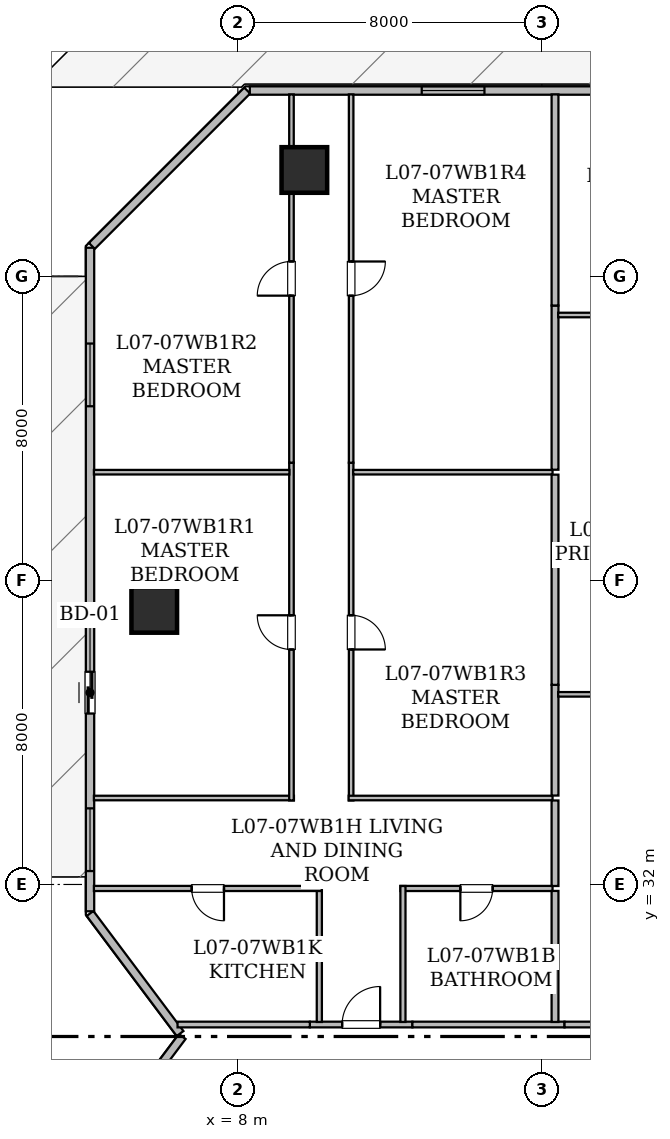
"""IFC4 building model, lengths in metres.
Left out: names, types, materials, properties, quantities, classifications, styles, units other than length and angle.
Written with IfcOpenShell. Run it as: python <this file> out.ifc"""

import sys

from ifc_helpers import new_model, si_unit, direction, frame, frame_2d, origin, origin_2d, place, context, subcontext, project, spatial, rectangle, hollow_rectangle, extrude, element, fill, save


model = new_model("IFC4")
c1 = context("Model", 3, precision=1e-05, world=origin(), true_north=direction((0.0, 1.0)))
c2 = subcontext(c1, "Body", "Model", "MODEL_VIEW")
j1 = project(units=[si_unit("LENGTHUNIT", "METRE"), si_unit("PLANEANGLEUNIT", "RADIAN")], contexts=[c1])
p1 = place(None, origin())
s1 = spatial("IfcSite", under=j1, at=p1, CompositionType="ELEMENT")
p2 = place(p1, origin())
s2 = spatial("IfcBuilding", under=s1, at=p2, CompositionType="ELEMENT")
p3 = place(p2, frame((0.0, 0.0, 33.3)))
s3 = spatial("IfcBuildingStorey", under=s2, at=p3, CompositionType="ELEMENT", Elevation=33.3)
for number, where, z_axis, x_axis in (
    (1, (9.75, 50.8, 0.025), (0.0, 0.0, 1.0), (1.0, 0.0, 0.0)),
    (2, (5.8, 39.225, 0.025), (0.0, 0.0, 1.0), (1.0, 0.0, 0.0)),
):
    element("IfcColumn", number, at=place(p3, frame(where, z_axis=z_axis, x_axis=x_axis)), inside=s3, PredefinedType="COLUMN", context=c2, shape_type="SweptSolid", body=[
        extrude(hollow_rectangle(XDim=1.2, YDim=1.2, WallThickness=0.06, at=origin_2d()), origin(), (0.0, 0.0, 1.0), 3.625),
    ])
p4 = place(p3, frame((4.145, 24.809, 0.0), z_axis=(0.0, 0.0, 1.0), x_axis=(0.599823674734, 0.800132213592, 0.0)))
e3 = element("IfcWall", 3, at=p4, inside=s3, PredefinedType="STANDARD", context=c2, shape_type="SweptSolid", body=[
    extrude(rectangle(XDim=3.988, YDim=0.22, at=frame_2d((1.994, 0.0))), origin(), (0.0, 0.0, 1.0), 3.43),
])
p5 = place(p3, frame((6.48, 28.077, 0.0), z_axis=(0.0, 0.0, 1.0), x_axis=(-0.599960442794, 0.800029666377, 0.0)))
e4 = element("IfcWall", 4, at=p5, inside=s3, PredefinedType="STANDARD", context=c2, shape_type="SweptSolid", body=[
    extrude(rectangle(XDim=3.95, YDim=0.22, at=frame_2d((1.975, 0.0))), origin(), (0.0, 0.0, 1.0), 3.43),
])
p6 = place(p3, frame((4.11, 31.295, 0.0), z_axis=(0.0, 0.0, 1.0), x_axis=(0.0, 1.0, 0.0)))
e5 = element("IfcWall", 5, at=p6, inside=s3, PredefinedType="STANDARD", context=c2, shape_type="SweptSolid", body=[
    extrude(rectangle(XDim=17.459, YDim=0.22, at=frame_2d((8.729, 0.0))), origin(), (0.0, 0.0, 1.0), 3.43),
])
p7 = place(p6, frame((5.203, 0.0, 0.0)))
e6 = element("IfcOpeningElement", 6, at=p7, cuts=e5, PredefinedType="OPENING", context=c2, shape_type="SweptSolid", body=[
    extrude(rectangle(XDim=1.1, YDim=2.2, at=frame_2d((0.55, 1.1))), frame((0.0, 0.12, 0.0), z_axis=(0.0, -1.0, 0.0), x_axis=(1.0, 0.0, 0.0)), (0.0, 0.0, 1.0), 0.24),
])
p8 = place(p6, frame((1.058, 0.0, 0.85)))
e7 = element("IfcOpeningElement", 7, at=p8, cuts=e5, PredefinedType="OPENING", context=c2, shape_type="SweptSolid", body=[
    extrude(rectangle(XDim=1.65, YDim=1.55, at=frame_2d((0.825, 0.775))), frame((0.0, 0.12, 0.0), z_axis=(0.0, -1.0, 0.0), x_axis=(1.0, 0.0, 0.0)), (0.0, 0.0, 1.0), 0.24),
])
p9 = place(p6, frame((13.288, 0.0, 0.85)))
e8 = element("IfcOpeningElement", 8, at=p9, cuts=e5, PredefinedType="OPENING", context=c2, shape_type="SweptSolid", body=[
    extrude(rectangle(XDim=1.65, YDim=1.55, at=frame_2d((0.825, 0.775))), frame((0.0, 0.12, 0.0), z_axis=(0.0, -1.0, 0.0), x_axis=(1.0, 0.0, 0.0)), (0.0, 0.0, 1.0), 0.24),
])
p10 = place(p3, frame((4.158, 48.802, 0.0), z_axis=(0.0, 0.0, 1.0), x_axis=(0.70712789547, 0.707085666273, 0.0)))
e9 = element("IfcWall", 9, at=p10, inside=s3, PredefinedType="STANDARD", context=c2, shape_type="SweptSolid", body=[
    extrude(rectangle(XDim=5.781, YDim=0.22, at=frame_2d((2.891, 0.0))), origin(), (0.0, 0.0, 1.0), 3.43),
])
p11 = place(p3, frame((8.315, 52.89, 0.0), z_axis=(0.0, 0.0, 1.0), x_axis=(1.0, 0.0, 0.0)))
e10 = element("IfcWall", 10, at=p11, inside=s3, PredefinedType="STANDARD", context=c2, shape_type="SweptSolid", body=[
    extrude(rectangle(XDim=37.439, YDim=0.22, at=frame_2d((18.719, 0.0))), origin(), (0.0, 0.0, 1.0), 3.43),
])
p12 = place(p11, frame((19.779, 0.0, 0.0)))
e11 = element("IfcOpeningElement", 11, at=p12, cuts=e10, PredefinedType="OPENING", context=c2, shape_type="SweptSolid", body=[
    extrude(rectangle(XDim=1.0, YDim=2.15, at=frame_2d((0.5, 1.075))), frame((0.0, 0.12, 0.0), z_axis=(0.0, -1.0, 0.0), x_axis=(1.0, 0.0, 0.0)), (0.0, 0.0, 1.0), 0.24),
])
p13 = place(p11, frame((4.524, 0.0, 0.85)))
e12 = element("IfcOpeningElement", 12, at=p13, cuts=e10, PredefinedType="OPENING", context=c2, shape_type="SweptSolid", body=[
    extrude(rectangle(XDim=1.65, YDim=1.55, at=frame_2d((0.825, 0.775))), frame((0.0, 0.12, 0.0), z_axis=(0.0, -1.0, 0.0), x_axis=(1.0, 0.0, 0.0)), (0.0, 0.0, 1.0), 0.24),
])
p14 = place(p11, frame((16.273, 0.0, 0.85)))
e13 = element("IfcOpeningElement", 13, at=p14, cuts=e10, PredefinedType="OPENING", context=c2, shape_type="SweptSolid", body=[
    extrude(rectangle(XDim=1.65, YDim=1.55, at=frame_2d((0.825, 0.775))), frame((0.0, 0.12, 0.0), z_axis=(0.0, -1.0, 0.0), x_axis=(1.0, 0.0, 0.0)), (0.0, 0.0, 1.0), 0.24),
])
p15 = place(p11, frame((14.285, 0.0, 0.8)))
e14 = element("IfcOpeningElement", 14, at=p15, cuts=e10, PredefinedType="OPENING", context=c2, shape_type="SweptSolid", body=[
    extrude(rectangle(XDim=1.2, YDim=1.5, at=frame_2d((0.6, 0.75))), frame((0.0, 0.12, 0.0), z_axis=(0.0, -1.0, 0.0), x_axis=(1.0, 0.0, 0.0)), (0.0, 0.0, 1.0), 0.24),
])
p16 = place(p11, frame((10.238, 0.0, 0.85)))
e15 = element("IfcOpeningElement", 15, at=p16, cuts=e10, PredefinedType="OPENING", context=c2, shape_type="SweptSolid", body=[
    extrude(rectangle(XDim=1.65, YDim=1.55, at=frame_2d((0.825, 0.775))), frame((0.0, 0.12, 0.0), z_axis=(0.0, -1.0, 0.0), x_axis=(1.0, 0.0, 0.0)), (0.0, 0.0, 1.0), 0.24),
])
p17 = place(p11, frame((25.185, 0.0, 0.8)))
e16 = element("IfcOpeningElement", 16, at=p17, cuts=e10, PredefinedType="OPENING", context=c2, shape_type="SweptSolid", body=[
    extrude(rectangle(XDim=1.2, YDim=1.5, at=frame_2d((0.6, 0.75))), frame((0.0, 0.12, 0.0), z_axis=(0.0, -1.0, 0.0), x_axis=(1.0, 0.0, 0.0)), (0.0, 0.0, 1.0), 0.24),
])
p18 = place(p11, frame((28.985, 0.0, 0.85)))
e17 = element("IfcOpeningElement", 17, at=p18, cuts=e10, PredefinedType="OPENING", context=c2, shape_type="SweptSolid", body=[
    extrude(rectangle(XDim=1.65, YDim=1.55, at=frame_2d((0.825, 0.775))), frame((0.0, 0.12, 0.0), z_axis=(0.0, -1.0, 0.0), x_axis=(1.0, 0.0, 0.0)), (0.0, 0.0, 1.0), 0.24),
])
p19 = place(p11, frame((33.49, 0.0, 0.85)))
e18 = element("IfcOpeningElement", 18, at=p19, cuts=e10, PredefinedType="OPENING", context=c2, shape_type="SweptSolid", body=[
    extrude(rectangle(XDim=1.65, YDim=1.55, at=frame_2d((0.825, 0.775))), frame((0.0, 0.12, 0.0), z_axis=(0.0, -1.0, 0.0), x_axis=(1.0, 0.0, 0.0)), (0.0, 0.0, 1.0), 0.24),
])
p20 = place(p11, frame((35.942, 0.0, 0.85)))
e19 = element("IfcOpeningElement", 19, at=p20, cuts=e10, PredefinedType="OPENING", context=c2, shape_type="SweptSolid", body=[
    extrude(rectangle(XDim=1.35, YDim=1.5, at=frame_2d((0.675, 0.75))), frame((0.0, 0.12, 0.0), z_axis=(0.0, -1.0, 0.0), x_axis=(1.0, 0.0, 0.0)), (0.0, 0.0, 1.0), 0.24),
])
p21 = place(p3, frame((9.895, 28.315, 0.0), z_axis=(0.0, 0.0, 1.0), x_axis=(1.0, 0.0, 0.0)))
e20 = element("IfcWall", 20, at=p21, inside=s3, PredefinedType="STANDARD", context=c2, shape_type="SweptSolid", body=[
    extrude(rectangle(XDim=2.698, YDim=0.15, at=frame_2d((1.349, 0.0))), origin(), (0.0, 0.0, 1.0), 3.43),
])
p22 = place(p21, frame((0.849, 0.0, 0.0)))
e21 = element("IfcOpeningElement", 21, at=p22, cuts=e20, PredefinedType="OPENING", context=c2, shape_type="SweptSolid", body=[
    extrude(rectangle(XDim=1.0, YDim=2.15, at=frame_2d((0.5, 1.075))), frame((0.0, 0.085, 0.0), z_axis=(0.0, -1.0, 0.0), x_axis=(1.0, 0.0, 0.0)), (0.0, 0.0, 1.0), 0.17),
])
p23 = place(p3, frame((12.593, 28.315, 0.0), z_axis=(0.0, 0.0, 1.0), x_axis=(1.0, 0.0, 0.0)))
e22 = element("IfcWall", 22, at=p23, inside=s3, PredefinedType="STANDARD", context=c2, shape_type="SweptSolid", body=[
    extrude(rectangle(XDim=4.003, YDim=0.15, at=frame_2d((2.001, 0.0))), origin(), (0.0, 0.0, 1.0), 3.43),
])
p24 = place(p3, frame((6.413, 28.315, 0.0), z_axis=(0.0, 0.0, 1.0), x_axis=(1.0, 0.0, 0.0)))
e23 = element("IfcWall", 23, at=p24, inside=s3, PredefinedType="STANDARD", context=c2, shape_type="SweptSolid", body=[
    extrude(rectangle(XDim=3.482, YDim=0.15, at=frame_2d((1.741, 0.0))), origin(), (0.0, 0.0, 1.0), 3.43),
])
p25 = place(p3, frame((16.596, 28.315, 0.0), z_axis=(0.0, 0.0, 1.0), x_axis=(1.0, 0.0, 0.0)))
e24 = element("IfcWall", 24, at=p25, inside=s3, PredefinedType="STANDARD", context=c2, shape_type="SweptSolid", body=[
    extrude(rectangle(XDim=5.565, YDim=0.15, at=frame_2d((2.782, 0.0))), origin(), (0.0, 0.0, 1.0), 2.647),
])
p26 = place(p3, frame((16.281, 31.895, 0.0), z_axis=(0.0, 0.0, 1.0), x_axis=(-1.0, 0.0, 0.0)))
e25 = element("IfcWall", 25, at=p26, inside=s3, PredefinedType="PARTITIONING", context=c2, shape_type="SweptSolid", body=[
    extrude(rectangle(XDim=4.002, YDim=0.135, at=frame_2d((2.001, 0.0))), origin(), (0.0, 0.0, 1.0), 3.43),
])
p27 = place(p26, frame((1.576, 0.0, 0.0)))
e26 = element("IfcOpeningElement", 26, at=p27, cuts=e25, PredefinedType="OPENING", context=c2, shape_type="SweptSolid", body=[
    extrude(rectangle(XDim=0.85, YDim=2.1, at=frame_2d((0.425, 1.05))), frame((0.0, 0.077, 0.0), z_axis=(0.0, -1.0, 0.0), x_axis=(1.0, 0.0, 0.0)), (0.0, 0.0, 1.0), 0.155),
])
for number, where, z_axis, x_axis in (
    (27, (12.344, 31.96, 0.0), (0.0, 0.0, 1.0), (0.0, -1.0, 0.0)),
    (28, (10.144, 28.382, 0.0), (0.0, 0.0, 1.0), (0.0, 1.0, 0.0)),
):
    element("IfcWall", number, at=place(p3, frame(where, z_axis=z_axis, x_axis=x_axis)), inside=s3, PredefinedType="PARTITIONING", context=c2, shape_type="SweptSolid", body=[
        extrude(rectangle(XDim=3.578, YDim=0.135, at=frame_2d((1.789, 0.0))), origin(), (0.0, 0.0, 1.0), 3.43),
    ])
p28 = place(p3, frame((10.209, 31.895, 0.0), z_axis=(0.0, 0.0, 1.0), x_axis=(-1.0, 0.0, 0.0)))
e29 = element("IfcWall", 29, at=p28, inside=s3, PredefinedType="PARTITIONING", context=c2, shape_type="SweptSolid", body=[
    extrude(rectangle(XDim=5.997, YDim=0.135, at=frame_2d((2.999, 0.0))), origin(), (0.0, 0.0, 1.0), 2.803),
])
p29 = place(p28, frame((2.574, 0.0, 0.0)))
e30 = element("IfcOpeningElement", 30, at=p29, cuts=e29, PredefinedType="OPENING", context=c2, shape_type="SweptSolid", body=[
    extrude(rectangle(XDim=0.85, YDim=2.1, at=frame_2d((0.425, 1.05))), frame((0.0, 0.077, 0.0), z_axis=(0.0, -1.0, 0.0), x_axis=(1.0, 0.0, 0.0)), (0.0, 0.0, 1.0), 0.155),
])
p30 = place(p3, frame((4.212, 34.275, 0.0), z_axis=(0.0, 0.0, 1.0), x_axis=(1.0, 0.0, 0.0)))
e31 = element("IfcWall", 31, at=p30, inside=s3, PredefinedType="PARTITIONING", context=c2, shape_type="SweptSolid", body=[
    extrude(rectangle(XDim=5.264, YDim=0.12, at=frame_2d((2.632, 0.0))), origin(), (0.0, 0.0, 1.0), 2.803),
])
p31 = place(p3, frame((9.411, 34.21, 0.0), z_axis=(0.0, 0.0, 1.0), x_axis=(0.0, 1.0, 0.0)))
e32 = element("IfcWall", 32, at=p31, inside=s3, PredefinedType="PARTITIONING", context=c2, shape_type="SweptSolid", body=[
    extrude(rectangle(XDim=8.887, YDim=0.12, at=frame_2d((4.443, 0.0))), origin(), (0.0, 0.0, 1.0), 2.647),
])
p32 = place(p31, frame((3.973, 0.0, 0.0)))
e33 = element("IfcOpeningElement", 33, at=p32, cuts=e32, PredefinedType="OPENING", context=c2, shape_type="SweptSolid", body=[
    extrude(rectangle(XDim=0.9, YDim=2.1, at=frame_2d((0.45, 1.05))), frame((0.0, 0.07, 0.0), z_axis=(0.0, -1.0, 0.0), x_axis=(1.0, 0.0, 0.0)), (0.0, 0.0, 1.0), 0.14),
])
p33 = place(p3, frame((9.411, 43.097, 0.0), z_axis=(0.0, 0.0, 1.0), x_axis=(0.0, 1.0, 0.0)))
e34 = element("IfcWall", 34, at=p33, inside=s3, PredefinedType="PARTITIONING", context=c2, shape_type="SweptSolid", body=[
    extrude(rectangle(XDim=9.691, YDim=0.12, at=frame_2d((4.846, 0.0))), origin(), (0.0, 0.0, 1.0), 2.647),
])
p34 = place(p33, frame((4.396, 0.0, 0.0)))
e35 = element("IfcOpeningElement", 35, at=p34, cuts=e34, PredefinedType="OPENING", context=c2, shape_type="SweptSolid", body=[
    extrude(rectangle(XDim=0.9, YDim=2.1, at=frame_2d((0.45, 1.05))), frame((0.0, 0.07, 0.0), z_axis=(0.0, -1.0, 0.0), x_axis=(1.0, 0.0, 0.0)), (0.0, 0.0, 1.0), 0.14),
])
p35 = place(p3, frame((10.981, 43.097, 0.0), z_axis=(0.0, 0.0, 1.0), x_axis=(0.0, -1.0, 0.0)))
e36 = element("IfcWall", 36, at=p35, inside=s3, PredefinedType="PARTITIONING", context=c2, shape_type="SweptSolid", body=[
    extrude(rectangle(XDim=8.887, YDim=0.12, at=frame_2d((4.443, 0.0))), origin(), (0.0, 0.0, 1.0), 2.647),
])
p36 = place(p35, frame((4.014, 0.0, 0.0)))
e37 = element("IfcOpeningElement", 37, at=p36, cuts=e36, PredefinedType="OPENING", context=c2, shape_type="SweptSolid", body=[
    extrude(rectangle(XDim=0.9, YDim=2.1, at=frame_2d((0.45, 1.05))), frame((0.0, 0.07, 0.0), z_axis=(0.0, -1.0, 0.0), x_axis=(1.0, 0.0, 0.0)), (0.0, 0.0, 1.0), 0.14),
])
p37 = place(p3, frame((10.916, 34.275, 0.0), z_axis=(0.0, 0.0, 1.0), x_axis=(1.0, 0.0, 0.0)))
e38 = element("IfcWall", 38, at=p37, inside=s3, PredefinedType="PARTITIONING", context=c2, shape_type="SweptSolid", body=[
    extrude(rectangle(XDim=5.365, YDim=0.12, at=frame_2d((2.683, 0.0))), origin(), (0.0, 0.0, 1.0), 3.43),
])
p38 = place(p3, frame((10.981, 52.788, 0.0), z_axis=(0.0, 0.0, 1.0), x_axis=(0.0, -1.0, 0.0)))
e39 = element("IfcWall", 39, at=p38, inside=s3, PredefinedType="PARTITIONING", context=c2, shape_type="SweptSolid", body=[
    extrude(rectangle(XDim=9.691, YDim=0.12, at=frame_2d((4.846, 0.0))), origin(), (0.0, 0.0, 1.0), 2.647),
])
p39 = place(p38, frame((4.396, 0.0, 0.0)))
e40 = element("IfcOpeningElement", 40, at=p39, cuts=e39, PredefinedType="OPENING", context=c2, shape_type="SweptSolid", body=[
    extrude(rectangle(XDim=0.9, YDim=2.1, at=frame_2d((0.45, 1.05))), frame((0.0, 0.07, 0.0), z_axis=(0.0, -1.0, 0.0), x_axis=(1.0, 0.0, 0.0)), (0.0, 0.0, 1.0), 0.14),
])
p40 = place(p3, frame((16.346, 34.21, 0.0), z_axis=(0.0, 0.0, 1.0), x_axis=(0.0, -1.0, 0.0)))
e41 = element("IfcWall", 41, at=p40, inside=s3, PredefinedType="STANDARD", context=c2, shape_type="SweptSolid", body=[
    extrude(rectangle(XDim=2.25, YDim=0.18, at=frame_2d((1.125, 0.0))), origin(), (0.0, 0.0, 1.0), 3.43),
])
p41 = place(p3, frame((16.346, 31.83, 0.0), z_axis=(0.0, 0.0, 1.0), x_axis=(0.0, -1.0, 0.0)))
e42 = element("IfcWall", 42, at=p41, inside=s3, PredefinedType="STANDARD", context=c2, shape_type="SweptSolid", body=[
    extrude(rectangle(XDim=3.448, YDim=0.18, at=frame_2d((1.724, 0.0))), origin(), (0.0, 0.0, 1.0), 3.43),
])
p42 = place(p3, frame((4.212, 42.848, 0.0), z_axis=(0.0, 0.0, 1.0), x_axis=(1.0, 0.0, 0.0)))
e43 = element("IfcWall", 43, at=p42, inside=s3, PredefinedType="PARTITIONING", context=c2, shape_type="SweptSolid", body=[
    extrude(rectangle(XDim=5.145, YDim=0.12, at=frame_2d((2.573, 0.0))), origin(), (0.0, 0.0, 1.0), 2.803),
])
p43 = place(p3, frame((11.035, 42.848, 0.0), z_axis=(0.0, 0.0, 1.0), x_axis=(1.0, 0.0, 0.0)))
e44 = element("IfcWall", 44, at=p43, inside=s3, PredefinedType="PARTITIONING", context=c2, shape_type="SweptSolid", body=[
    extrude(rectangle(XDim=5.246, YDim=0.12, at=frame_2d((2.623, 0.0))), origin(), (0.0, 0.0, 1.0), 2.647),
])
p44 = place(p3, frame((16.346, 37.252, 0.0), z_axis=(0.0, 0.0, 1.0), x_axis=(0.0, -1.0, 0.0)))
e45 = element("IfcWall", 45, at=p44, inside=s3, PredefinedType="STANDARD", context=c2, shape_type="SweptSolid", body=[
    extrude(rectangle(XDim=2.912, YDim=0.18, at=frame_2d((1.456, 0.0))), origin(), (0.0, 0.0, 1.0), 3.43),
])
p45 = place(p3, frame((16.346, 42.783, 0.0), z_axis=(0.0, 0.0, 1.0), x_axis=(0.0, -1.0, 0.0)))
e46 = element("IfcWall", 46, at=p45, inside=s3, PredefinedType="STANDARD", context=c2, shape_type="SweptSolid", body=[
    extrude(rectangle(XDim=5.531, YDim=0.18, at=frame_2d((2.766, 0.0))), origin(), (0.0, 0.0, 1.0), 2.647),
])
p46 = place(p3, frame((16.346, 47.233, 0.0), z_axis=(0.0, 0.0, 1.0), x_axis=(0.0, -1.0, 0.0)))
e47 = element("IfcWall", 47, at=p46, inside=s3, PredefinedType="STANDARD", context=c2, shape_type="SweptSolid", body=[
    extrude(rectangle(XDim=4.32, YDim=0.18, at=frame_2d((2.16, 0.0))), origin(), (0.0, 0.0, 1.0), 3.43),
])
p47 = place(p3, frame((16.346, 52.788, 0.0), z_axis=(0.0, 0.0, 1.0), x_axis=(0.0, -1.0, 0.0)))
e48 = element("IfcWall", 48, at=p47, inside=s3, PredefinedType="STANDARD", context=c2, shape_type="SweptSolid", body=[
    extrude(rectangle(XDim=5.555, YDim=0.18, at=frame_2d((2.778, 0.0))), origin(), (0.0, 0.0, 1.0), 2.803),
])
p48 = place(p3, frame((16.428, 37.003, 0.0), z_axis=(0.0, 0.0, 1.0), x_axis=(1.0, 0.0, 0.0)))
e49 = element("IfcWall", 49, at=p48, inside=s3, PredefinedType="PARTITIONING", context=c2, shape_type="SweptSolid", body=[
    extrude(rectangle(XDim=5.928, YDim=0.12, at=frame_2d((2.964, 0.0))), origin(), (0.0, 0.0, 1.0), 2.647),
])
p49 = place(p48, frame((2.514, 0.0, 0.0)))
e50 = element("IfcOpeningElement", 50, at=p49, cuts=e49, PredefinedType="OPENING", context=c2, shape_type="SweptSolid", body=[
    extrude(rectangle(XDim=0.9, YDim=2.1, at=frame_2d((0.45, 1.05))), frame((0.0, 0.07, 0.0), z_axis=(0.0, -1.0, 0.0), x_axis=(1.0, 0.0, 0.0)), (0.0, 0.0, 1.0), 0.14),
])
p50 = place(p3, frame((16.428, 46.984, 0.0), z_axis=(0.0, 0.0, 1.0), x_axis=(1.0, 0.0, 0.0)))
e51 = element("IfcWall", 51, at=p50, inside=s3, PredefinedType="PARTITIONING", context=c2, shape_type="SweptSolid", body=[
    extrude(rectangle(XDim=5.928, YDim=0.12, at=frame_2d((2.964, 0.0))), origin(), (0.0, 0.0, 1.0), 2.647),
])
p51 = place(p50, frame((2.514, 0.0, 0.0)))
e52 = element("IfcOpeningElement", 52, at=p51, cuts=e51, PredefinedType="OPENING", context=c2, shape_type="SweptSolid", body=[
    extrude(rectangle(XDim=0.9, YDim=2.1, at=frame_2d((0.45, 1.05))), frame((0.0, 0.07, 0.0), z_axis=(0.0, -1.0, 0.0), x_axis=(1.0, 0.0, 0.0)), (0.0, 0.0, 1.0), 0.14),
])
p52 = place(p7, origin())
e53 = element("IfcDoor", 53, at=p52, inside=s3, OperationType="SLIDING_TO_LEFT", PredefinedType="DOOR", context=c2, shape_type="SweptSolid", body=[
    extrude(rectangle(XDim=1.1, YDim=2.2, at=frame_2d((0.55, 1.1))), frame((0.0, 0.025, 0.0), z_axis=(0.0, -1.0, 0.0), x_axis=(1.0, 0.0, 0.0)), (0.0, 0.0, 1.0), 0.05),
])
fill(e6, e53)
p53 = place(p8, origin())
e54 = element("IfcWindow", 54, at=p53, inside=s3, PartitioningType="SINGLE_PANEL", PredefinedType="WINDOW", context=c2, shape_type="SweptSolid", body=[
    extrude(rectangle(XDim=1.65, YDim=1.55, at=frame_2d((0.825, 0.775))), frame((0.0, 0.03, 0.0), z_axis=(0.0, -1.0, 0.0), x_axis=(1.0, 0.0, 0.0)), (0.0, 0.0, 1.0), 0.06),
])
fill(e7, e54)
p54 = place(p9, origin())
e55 = element("IfcWindow", 55, at=p54, inside=s3, PartitioningType="SINGLE_PANEL", PredefinedType="WINDOW", context=c2, shape_type="SweptSolid", body=[
    extrude(rectangle(XDim=1.65, YDim=1.55, at=frame_2d((0.825, 0.775))), frame((0.0, 0.03, 0.0), z_axis=(0.0, -1.0, 0.0), x_axis=(1.0, 0.0, 0.0)), (0.0, 0.0, 1.0), 0.06),
])
fill(e8, e55)
p55 = place(p13, origin())
e56 = element("IfcWindow", 56, at=p55, inside=s3, PartitioningType="SINGLE_PANEL", PredefinedType="WINDOW", context=c2, shape_type="SweptSolid", body=[
    extrude(rectangle(XDim=1.65, YDim=1.55, at=frame_2d((0.825, 0.775))), frame((0.0, 0.03, 0.0), z_axis=(0.0, -1.0, 0.0), x_axis=(1.0, 0.0, 0.0)), (0.0, 0.0, 1.0), 0.06),
])
fill(e12, e56)
p56 = place(p22, origin())
e57 = element("IfcDoor", 57, at=p56, inside=s3, OperationType="SINGLE_SWING_RIGHT", PredefinedType="DOOR", context=c2, shape_type="SweptSolid", body=[
    extrude(rectangle(XDim=1.0, YDim=2.15, at=frame_2d((0.5, 1.075))), frame((0.0, 0.025, 0.0), z_axis=(0.0, -1.0, 0.0), x_axis=(1.0, 0.0, 0.0)), (0.0, 0.0, 1.0), 0.05),
])
fill(e21, e57)
p57 = place(p27, origin())
e58 = element("IfcDoor", 58, at=p57, inside=s3, OperationType="SINGLE_SWING_RIGHT", PredefinedType="DOOR", context=c2, shape_type="SweptSolid", body=[
    extrude(rectangle(XDim=0.85, YDim=2.1, at=frame_2d((0.425, 1.05))), frame((0.0, 0.025, 0.0), z_axis=(0.0, -1.0, 0.0), x_axis=(1.0, 0.0, 0.0)), (0.0, 0.0, 1.0), 0.05),
])
fill(e26, e58)
p58 = place(p29, origin())
e59 = element("IfcDoor", 59, at=p58, inside=s3, OperationType="SINGLE_SWING_LEFT", PredefinedType="DOOR", context=c2, shape_type="SweptSolid", body=[
    extrude(rectangle(XDim=0.85, YDim=2.1, at=frame_2d((0.425, 1.05))), frame((0.0, 0.025, 0.0), z_axis=(0.0, -1.0, 0.0), x_axis=(1.0, 0.0, 0.0)), (0.0, 0.0, 1.0), 0.05),
])
fill(e30, e59)
p59 = place(p32, origin())
e60 = element("IfcDoor", 60, at=p59, inside=s3, OperationType="SINGLE_SWING_RIGHT", PredefinedType="DOOR", context=c2, shape_type="SweptSolid", body=[
    extrude(rectangle(XDim=0.9, YDim=2.1, at=frame_2d((0.45, 1.05))), frame((0.0, 0.025, 0.0), z_axis=(0.0, -1.0, 0.0), x_axis=(1.0, 0.0, 0.0)), (0.0, 0.0, 1.0), 0.05),
])
fill(e33, e60)
p60 = place(p34, origin())
e61 = element("IfcDoor", 61, at=p60, inside=s3, OperationType="SINGLE_SWING_LEFT", PredefinedType="DOOR", context=c2, shape_type="SweptSolid", body=[
    extrude(rectangle(XDim=0.9, YDim=2.1, at=frame_2d((0.45, 1.05))), frame((0.0, 0.025, 0.0), z_axis=(0.0, -1.0, 0.0), x_axis=(1.0, 0.0, 0.0)), (0.0, 0.0, 1.0), 0.05),
])
fill(e35, e61)
p61 = place(p36, origin())
e62 = element("IfcDoor", 62, at=p61, inside=s3, OperationType="SINGLE_SWING_RIGHT", PredefinedType="DOOR", context=c2, shape_type="SweptSolid", body=[
    extrude(rectangle(XDim=0.9, YDim=2.1, at=frame_2d((0.45, 1.05))), frame((0.0, 0.025, 0.0), z_axis=(0.0, -1.0, 0.0), x_axis=(1.0, 0.0, 0.0)), (0.0, 0.0, 1.0), 0.05),
])
fill(e37, e62)
p62 = place(p39, origin())
e63 = element("IfcDoor", 63, at=p62, inside=s3, OperationType="SINGLE_SWING_LEFT", PredefinedType="DOOR", context=c2, shape_type="SweptSolid", body=[
    extrude(rectangle(XDim=0.9, YDim=2.1, at=frame_2d((0.45, 1.05))), frame((0.0, 0.025, 0.0), z_axis=(0.0, -1.0, 0.0), x_axis=(1.0, 0.0, 0.0)), (0.0, 0.0, 1.0), 0.05),
])
fill(e40, e63)
save(model, sys.argv[1])
